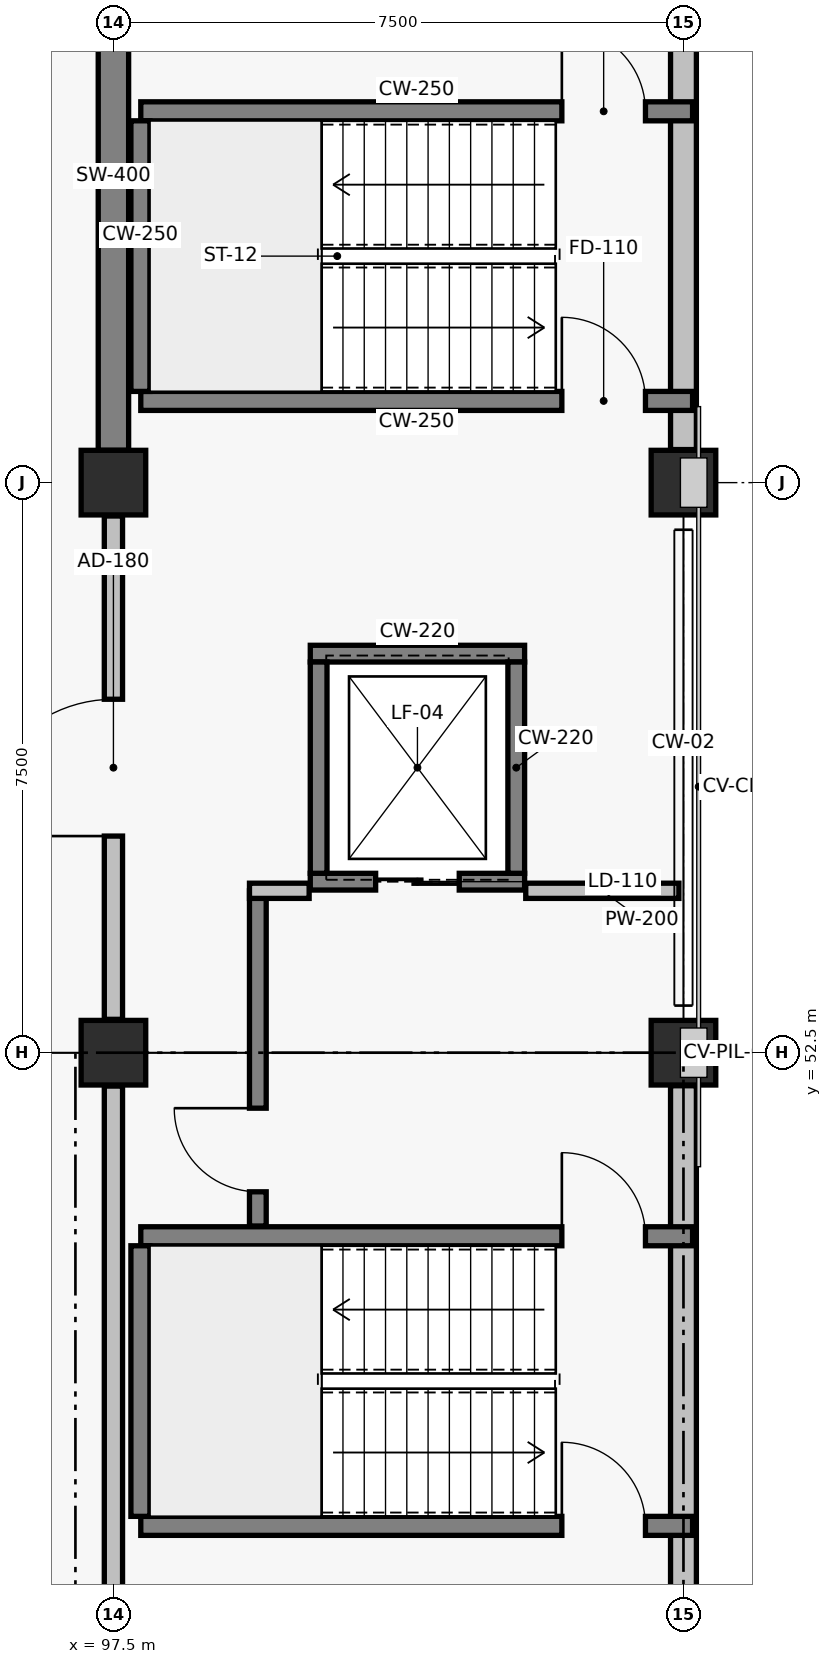
"""IFC4 building model, lengths in metres.
Left out: names, types, materials, properties, quantities, classifications, styles, units other than length and angle.
Written with IfcOpenShell. Run it as: python <this file> out.ifc"""

import sys

from ifc_helpers import new_model, si_unit, direction, frame, frame_2d, origin, origin_2d, place, context, subcontext, project, spatial, rectangle, extrude, element, fill, save


model = new_model("IFC4")
c1 = context("Model", 3, precision=1e-05, world=origin(), true_north=direction((0.0, 1.0)))
c2 = subcontext(c1, "Body", "Model", "MODEL_VIEW")
j1 = project(units=[si_unit("LENGTHUNIT", "METRE"), si_unit("PLANEANGLEUNIT", "RADIAN")], contexts=[c1])
p1 = place(None, origin())
s1 = spatial("IfcSite", under=j1, at=p1, CompositionType="ELEMENT")
p2 = place(p1, origin())
s2 = spatial("IfcBuilding", under=s1, at=p2, CompositionType="ELEMENT")
p3 = place(p2, frame((0.0, 0.0, 4.8)))
s3 = spatial("IfcBuildingStorey", under=s2, at=p3, CompositionType="ELEMENT", Elevation=4.8)
for number, where, z_axis, x_axis in (
    (1, (97.5, 52.5, 0.0), (0.0, 0.0, 1.0), (1.0, 0.0, 0.0)),
    (2, (97.5, 60.0, 0.0), (0.0, 0.0, 1.0), (1.0, 0.0, 0.0)),
    (3, (105.0, 52.5, 0.0), (0.0, 0.0, 1.0), (1.0, 0.0, 0.0)),
    (4, (105.0, 60.0, 0.0), (0.0, 0.0, 1.0), (1.0, 0.0, 0.0)),
):
    element("IfcColumn", number, at=place(p3, frame(where, z_axis=z_axis, x_axis=x_axis)), inside=s3, PredefinedType="COLUMN", context=c2, shape_type="SweptSolid", body=[
        extrude(rectangle(XDim=0.85, YDim=0.85, at=origin_2d()), origin(), (0.0, 0.0, 1.0), 4.2),
    ])
p4 = place(p3, frame((97.5, 60.425, 0.0), z_axis=(0.0, 0.0, 1.0), x_axis=(0.0, 1.0, 0.0)))
e5 = element("IfcWall", 5, at=p4, inside=s3, PredefinedType="SHEAR", context=c2, shape_type="SweptSolid", body=[
    extrude(rectangle(XDim=6.65, YDim=0.4, at=frame_2d((3.325, 0.0))), origin(), (0.0, 0.0, 1.0), 2.87),
])
p5 = place(p3, frame((105.0, 45.435, 0.0), z_axis=(0.0, 0.0, 1.0), x_axis=(0.0, 1.0, 0.0)))
e6 = element("IfcWall", 6, at=p5, inside=s3, PredefinedType="SOLIDWALL", context=c2, shape_type="SweptSolid", body=[
    extrude(rectangle(XDim=6.63, YDim=0.34, at=frame_2d((3.315, 0.0))), origin(), (0.0, 0.0, 1.0), 2.94),
])
p6 = place(p3, frame((105.0, 60.435, 0.0), z_axis=(0.0, 0.0, 1.0), x_axis=(0.0, 1.0, 0.0)))
e7 = element("IfcWall", 7, at=p6, inside=s3, PredefinedType="SOLIDWALL", context=c2, shape_type="SweptSolid", body=[
    extrude(rectangle(XDim=6.63, YDim=0.34, at=frame_2d((3.315, 0.0))), origin(), (0.0, 0.0, 1.0), 2.84),
])
p7 = place(p3, frame((97.86, 46.275, 0.0), z_axis=(0.0, 0.0, 1.0), x_axis=(1.0, 0.0, 0.0)))
e8 = element("IfcWall", 8, at=p7, inside=s3, PredefinedType="SOLIDWALL", context=c2, shape_type="SweptSolid", body=[
    extrude(rectangle(XDim=7.26, YDim=0.25, at=frame_2d((3.63, 0.0))), origin(), (0.0, 0.0, 1.0), 3.92),
])
p8 = place(p7, frame((5.54, 0.0, 0.0)))
e9 = element("IfcOpeningElement", 9, at=p8, cuts=e8, PredefinedType="OPENING", context=c2, shape_type="SweptSolid", body=[
    extrude(rectangle(XDim=1.1, YDim=2.15, at=frame_2d((0.55, 1.075))), frame((0.0, 0.135, 0.0), z_axis=(0.0, -1.0, 0.0), x_axis=(1.0, 0.0, 0.0)), (0.0, 0.0, 1.0), 0.27),
])
p9 = place(p3, frame((97.86, 50.085, 0.0), z_axis=(0.0, 0.0, 1.0), x_axis=(1.0, 0.0, 0.0)))
e10 = element("IfcWall", 10, at=p9, inside=s3, PredefinedType="SOLIDWALL", context=c2, shape_type="SweptSolid", body=[
    extrude(rectangle(XDim=7.26, YDim=0.25, at=frame_2d((3.63, 0.0))), origin(), (0.0, 0.0, 1.0), 3.92),
])
p10 = place(p9, frame((5.54, 0.0, 0.0)))
e11 = element("IfcOpeningElement", 11, at=p10, cuts=e10, PredefinedType="OPENING", context=c2, shape_type="SweptSolid", body=[
    extrude(rectangle(XDim=1.1, YDim=2.15, at=frame_2d((0.55, 1.075))), frame((0.0, 0.135, 0.0), z_axis=(0.0, -1.0, 0.0), x_axis=(1.0, 0.0, 0.0)), (0.0, 0.0, 1.0), 0.27),
])
p11 = place(p3, frame((97.855, 46.4, 0.0), z_axis=(0.0, 0.0, 1.0), x_axis=(0.0, 1.0, 0.0)))
e12 = element("IfcWall", 12, at=p11, inside=s3, PredefinedType="SOLIDWALL", context=c2, shape_type="SweptSolid", body=[
    extrude(rectangle(XDim=3.56, YDim=0.25, at=frame_2d((1.78, 0.0))), origin(), (0.0, 0.0, 1.0), 3.92),
])
p12 = place(p3, frame((97.86, 61.075, 0.0), z_axis=(0.0, 0.0, 1.0), x_axis=(1.0, 0.0, 0.0)))
e13 = element("IfcWall", 13, at=p12, inside=s3, PredefinedType="SOLIDWALL", context=c2, shape_type="SweptSolid", body=[
    extrude(rectangle(XDim=7.26, YDim=0.25, at=frame_2d((3.63, 0.0))), origin(), (0.0, 0.0, 1.0), 3.92),
])
p13 = place(p12, frame((5.54, 0.0, 0.0)))
e14 = element("IfcOpeningElement", 14, at=p13, cuts=e13, PredefinedType="OPENING", context=c2, shape_type="SweptSolid", body=[
    extrude(rectangle(XDim=1.1, YDim=2.15, at=frame_2d((0.55, 1.075))), frame((0.0, 0.135, 0.0), z_axis=(0.0, -1.0, 0.0), x_axis=(1.0, 0.0, 0.0)), (0.0, 0.0, 1.0), 0.27),
])
p14 = place(p3, frame((97.86, 64.885, 0.0), z_axis=(0.0, 0.0, 1.0), x_axis=(1.0, 0.0, 0.0)))
e15 = element("IfcWall", 15, at=p14, inside=s3, PredefinedType="SOLIDWALL", context=c2, shape_type="SweptSolid", body=[
    extrude(rectangle(XDim=7.26, YDim=0.25, at=frame_2d((3.63, 0.0))), origin(), (0.0, 0.0, 1.0), 3.92),
])
p15 = place(p14, frame((5.54, 0.0, 0.0)))
e16 = element("IfcOpeningElement", 16, at=p15, cuts=e15, PredefinedType="OPENING", context=c2, shape_type="SweptSolid", body=[
    extrude(rectangle(XDim=1.1, YDim=2.15, at=frame_2d((0.55, 1.075))), frame((0.0, 0.135, 0.0), z_axis=(0.0, -1.0, 0.0), x_axis=(1.0, 0.0, 0.0)), (0.0, 0.0, 1.0), 0.27),
])
p16 = place(p3, frame((97.855, 61.2, 0.0), z_axis=(0.0, 0.0, 1.0), x_axis=(0.0, 1.0, 0.0)))
e17 = element("IfcWall", 17, at=p16, inside=s3, PredefinedType="SOLIDWALL", context=c2, shape_type="SweptSolid", body=[
    extrude(rectangle(XDim=3.56, YDim=0.25, at=frame_2d((1.78, 0.0))), origin(), (0.0, 0.0, 1.0), 3.92),
])
p17 = place(p3, frame((100.09, 54.75, 0.0), z_axis=(0.0, 0.0, 1.0), x_axis=(1.0, 0.0, 0.0)))
e18 = element("IfcWall", 18, at=p17, inside=s3, PredefinedType="SOLIDWALL", context=c2, shape_type="SweptSolid", body=[
    extrude(rectangle(XDim=2.82, YDim=0.22, at=frame_2d((1.41, 0.0))), origin(), (0.0, 0.0, 1.0), 3.92),
])
p18 = place(p17, frame((0.86, 0.0, 0.0)))
e19 = element("IfcOpeningElement", 19, at=p18, cuts=e18, PredefinedType="OPENING", context=c2, shape_type="SweptSolid", body=[
    extrude(rectangle(XDim=1.1, YDim=2.15, at=frame_2d((0.55, 1.075))), frame((0.0, 0.12, 0.0), z_axis=(0.0, -1.0, 0.0), x_axis=(1.0, 0.0, 0.0)), (0.0, 0.0, 1.0), 0.24),
])
p19 = place(p3, frame((100.09, 57.75, 0.0), z_axis=(0.0, 0.0, 1.0), x_axis=(1.0, 0.0, 0.0)))
e20 = element("IfcWall", 20, at=p19, inside=s3, PredefinedType="SOLIDWALL", context=c2, shape_type="SweptSolid", body=[
    extrude(rectangle(XDim=2.82, YDim=0.22, at=frame_2d((1.41, 0.0))), origin(), (0.0, 0.0, 1.0), 3.92),
])
for number, where, z_axis, x_axis in (
    (21, (100.2, 54.86, 0.0), (0.0, 0.0, 1.0), (0.0, 1.0, 0.0)),
    (22, (102.8, 54.86, 0.0), (0.0, 0.0, 1.0), (0.0, 1.0, 0.0)),
):
    element("IfcWall", number, at=place(p3, frame(where, z_axis=z_axis, x_axis=x_axis)), inside=s3, PredefinedType="SOLIDWALL", context=c2, shape_type="SweptSolid", body=[
        extrude(rectangle(XDim=2.78, YDim=0.22, at=frame_2d((1.39, 0.0))), origin(), (0.0, 0.0, 1.0), 3.92),
    ])
p20 = place(p3, frame((99.4, 50.22, 0.0), z_axis=(0.0, 0.0, 1.0), x_axis=(0.0, 1.0, 0.0)))
e23 = element("IfcWall", 23, at=p20, inside=s3, PredefinedType="SOLIDWALL", context=c2, shape_type="SweptSolid", body=[
    extrude(rectangle(XDim=4.41, YDim=0.22, at=frame_2d((2.205, 0.0))), origin(), (0.0, 0.0, 1.0), 3.92),
])
p21 = place(p20, frame((0.45, 0.0, 0.0)))
e24 = element("IfcOpeningElement", 24, at=p21, cuts=e23, PredefinedType="OPENING", context=c2, shape_type="SweptSolid", body=[
    extrude(rectangle(XDim=1.1, YDim=2.15, at=frame_2d((0.55, 1.075))), frame((0.0, 0.12, 0.0), z_axis=(0.0, -1.0, 0.0), x_axis=(1.0, 0.0, 0.0)), (0.0, 0.0, 1.0), 0.24),
])
p22 = place(p3, frame((99.29, 54.63, 0.0), z_axis=(0.0, 0.0, 1.0), x_axis=(1.0, 0.0, 0.0)))
e25 = element("IfcWall", 25, at=p22, inside=s3, PredefinedType="PARTITIONING", context=c2, shape_type="SweptSolid", body=[
    extrude(rectangle(XDim=0.785, YDim=0.2, at=frame_2d((0.393, 0.0))), origin(), (0.0, 0.0, 1.0), 3.9),
])
p23 = place(p3, frame((102.925, 54.63, 0.0), z_axis=(0.0, 0.0, 1.0), x_axis=(1.0, 0.0, 0.0)))
e26 = element("IfcWall", 26, at=p23, inside=s3, PredefinedType="PARTITIONING", context=c2, shape_type="SweptSolid", body=[
    extrude(rectangle(XDim=2.015, YDim=0.2, at=frame_2d((1.007, 0.0))), origin(), (0.0, 0.0, 1.0), 3.15),
])
p24 = place(p3, frame((97.5, 45.439, 0.0), z_axis=(0.0, 0.0, 1.0), x_axis=(0.0, 1.0, 0.0)))
e27 = element("IfcWall", 27, at=p24, inside=s3, PredefinedType="PARTITIONING", context=c2, shape_type="SweptSolid", body=[
    extrude(rectangle(XDim=6.622, YDim=0.24, at=frame_2d((3.311, 0.0))), origin(), (0.0, 0.0, 1.0), 2.94),
])
p25 = place(p3, frame((97.5, 52.939, 0.0), z_axis=(0.0, 0.0, 1.0), x_axis=(0.0, 1.0, 0.0)))
e28 = element("IfcWall", 28, at=p25, inside=s3, PredefinedType="PARTITIONING", context=c2, shape_type="SweptSolid", body=[
    extrude(rectangle(XDim=6.622, YDim=0.24, at=frame_2d((3.311, 0.0))), origin(), (0.0, 0.0, 1.0), 2.99),
])
p26 = place(p25, frame((2.411, 0.0, 0.0)))
e29 = element("IfcOpeningElement", 29, at=p26, cuts=e28, PredefinedType="OPENING", context=c2, shape_type="SweptSolid", body=[
    extrude(rectangle(XDim=1.8, YDim=2.16, at=frame_2d((0.9, 1.08))), frame((0.0, 0.13, 0.0), z_axis=(0.0, -1.0, 0.0), x_axis=(1.0, 0.0, 0.0)), (0.0, 0.0, 1.0), 0.26),
])
p27 = place(p8, origin())
e30 = element("IfcDoor", 30, at=p27, inside=s3, OperationType="SINGLE_SWING_LEFT", PredefinedType="DOOR", context=c2, shape_type="SweptSolid", body=[
    extrude(rectangle(XDim=1.1, YDim=2.15, at=frame_2d((0.55, 1.075))), frame((0.0, 0.025, 0.0), z_axis=(0.0, -1.0, 0.0), x_axis=(1.0, 0.0, 0.0)), (0.0, 0.0, 1.0), 0.05),
])
fill(e9, e30)
p28 = place(p10, frame((1.1, 0.0, 0.0), z_axis=(0.0, 0.0, 1.0), x_axis=(-1.0, 0.0, 0.0)))
e31 = element("IfcDoor", 31, at=p28, inside=s3, OperationType="SINGLE_SWING_RIGHT", PredefinedType="DOOR", context=c2, shape_type="SweptSolid", body=[
    extrude(rectangle(XDim=1.1, YDim=2.15, at=frame_2d((0.55, 1.075))), frame((0.0, 0.025, 0.0), z_axis=(0.0, -1.0, 0.0), x_axis=(1.0, 0.0, 0.0)), (0.0, 0.0, 1.0), 0.05),
])
fill(e11, e31)
p29 = place(p13, origin())
e32 = element("IfcDoor", 32, at=p29, inside=s3, OperationType="SINGLE_SWING_LEFT", PredefinedType="DOOR", context=c2, shape_type="SweptSolid", body=[
    extrude(rectangle(XDim=1.1, YDim=2.15, at=frame_2d((0.55, 1.075))), frame((0.0, 0.025, 0.0), z_axis=(0.0, -1.0, 0.0), x_axis=(1.0, 0.0, 0.0)), (0.0, 0.0, 1.0), 0.05),
])
fill(e14, e32)
p30 = place(p15, frame((1.1, 0.0, 0.0), z_axis=(0.0, 0.0, 1.0), x_axis=(-1.0, 0.0, 0.0)))
e33 = element("IfcDoor", 33, at=p30, inside=s3, OperationType="SINGLE_SWING_RIGHT", PredefinedType="DOOR", context=c2, shape_type="SweptSolid", body=[
    extrude(rectangle(XDim=1.1, YDim=2.15, at=frame_2d((0.55, 1.075))), frame((0.0, 0.025, 0.0), z_axis=(0.0, -1.0, 0.0), x_axis=(1.0, 0.0, 0.0)), (0.0, 0.0, 1.0), 0.05),
])
fill(e16, e33)
p31 = place(p18, origin())
e34 = element("IfcDoor", 34, at=p31, inside=s3, OperationType="SLIDING_TO_LEFT", PredefinedType="DOOR", context=c2, shape_type="SweptSolid", body=[
    extrude(rectangle(XDim=1.1, YDim=2.15, at=frame_2d((0.55, 1.075))), frame((0.0, 0.025, 0.0), z_axis=(0.0, -1.0, 0.0), x_axis=(1.0, 0.0, 0.0)), (0.0, 0.0, 1.0), 0.05),
])
fill(e19, e34)
p32 = place(p21, origin())
e35 = element("IfcDoor", 35, at=p32, inside=s3, OperationType="SINGLE_SWING_RIGHT", PredefinedType="DOOR", context=c2, shape_type="SweptSolid", body=[
    extrude(rectangle(XDim=1.1, YDim=2.15, at=frame_2d((0.55, 1.075))), frame((0.0, 0.025, 0.0), z_axis=(0.0, -1.0, 0.0), x_axis=(1.0, 0.0, 0.0)), (0.0, 0.0, 1.0), 0.05),
])
fill(e24, e35)
p33 = place(p26, origin())
e36 = element("IfcDoor", 36, at=p33, inside=s3, OperationType="SINGLE_SWING_LEFT", PredefinedType="DOOR", context=c2, shape_type="SweptSolid", body=[
    extrude(rectangle(XDim=1.8, YDim=2.16, at=frame_2d((0.9, 1.08))), frame((0.0, 0.025, 0.0), z_axis=(0.0, -1.0, 0.0), x_axis=(1.0, 0.0, 0.0)), (0.0, 0.0, 1.0), 0.05),
])
fill(e29, e36)
save(model, sys.argv[1])
